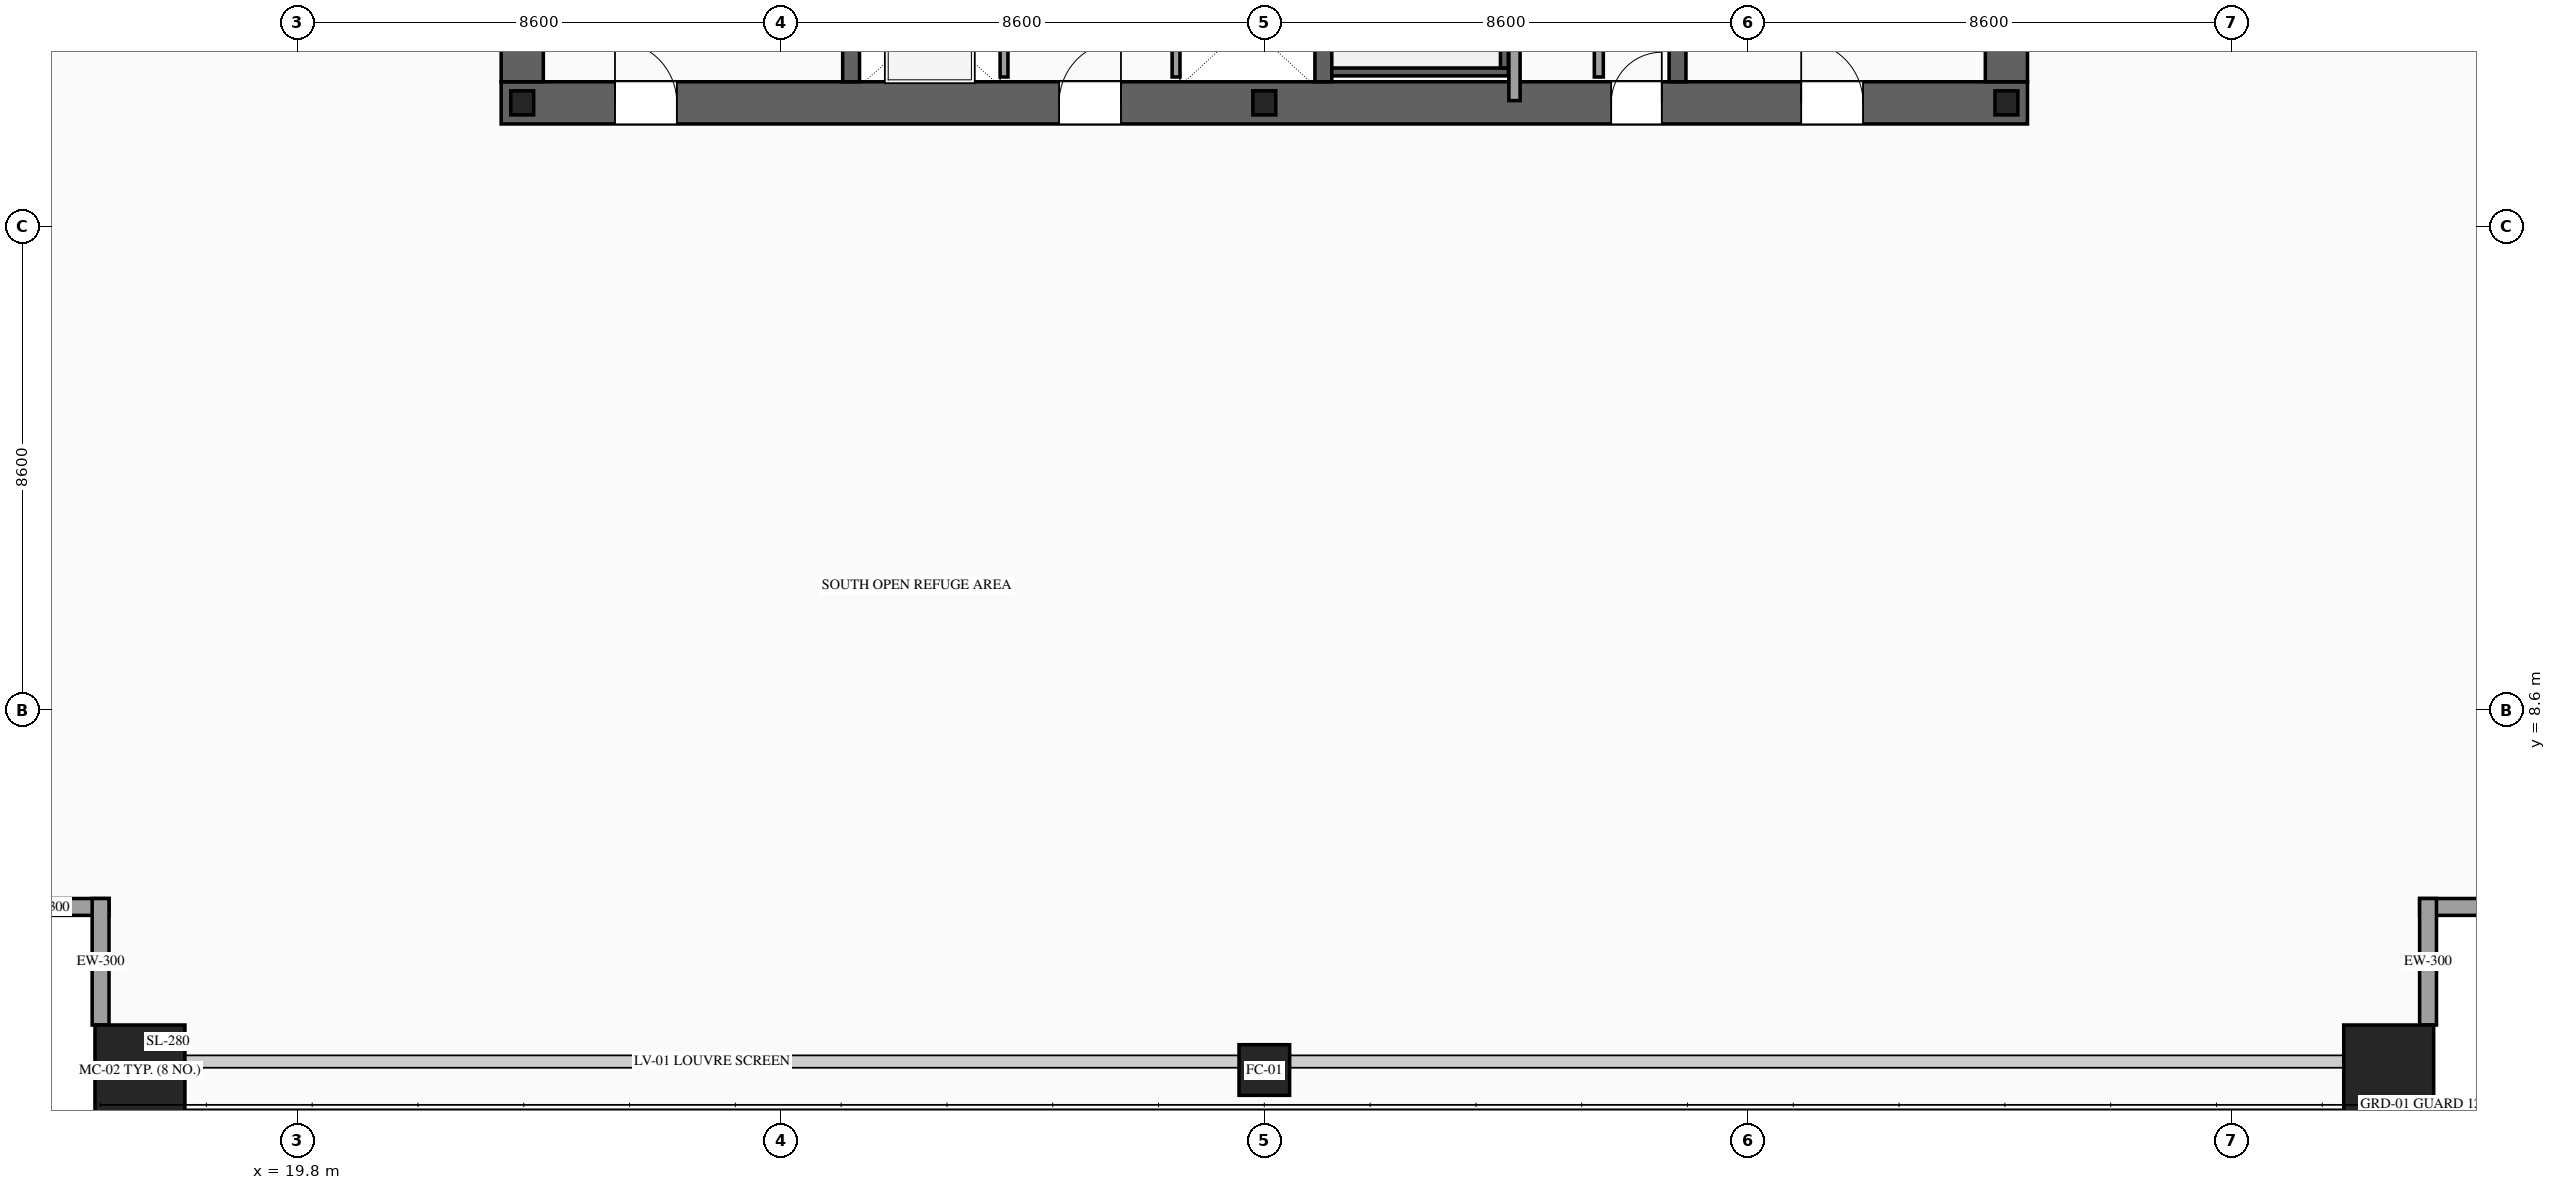
"""IFC4 building model, lengths in metres.
Left out: names, types, materials, properties, quantities, classifications, styles, units other than length and angle.
Written with IfcOpenShell. Run it as: python <this file> out.ifc"""

import sys

from ifc_helpers import new_model, si_unit, direction, frame, frame_2d, origin, origin_2d, place, context, subcontext, project, spatial, rectangle, hollow_rectangle, i_section, extrude, source, transform, mapped, element, fill, save


model = new_model("IFC4")
c1 = context("Model", 3, precision=1e-05, world=origin(), true_north=direction((0.0, 1.0)))
c2 = subcontext(c1, "Body", "Model", "MODEL_VIEW")
j1 = project(units=[si_unit("LENGTHUNIT", "METRE"), si_unit("PLANEANGLEUNIT", "RADIAN")], contexts=[c1])
p1 = place(None, origin())
s1 = spatial("IfcSite", under=j1, at=p1, CompositionType="ELEMENT")
p2 = place(p1, origin())
s2 = spatial("IfcBuilding", under=s1, at=p2, CompositionType="ELEMENT")
p3 = place(p2, frame((0.0, 0.0, 85.6)))
s3 = spatial("IfcBuildingStorey", under=s2, at=p3, CompositionType="ELEMENT", Elevation=85.6)
p4 = place(p3, frame((23.425, 19.4, 0.0), z_axis=(0.0, 0.0, 1.0), x_axis=(1.0, 0.0, 0.0)))
e1 = element("IfcWall", 1, at=p4, inside=s3, PredefinedType="SHEAR", context=c2, shape_type="SweptSolid", body=[
    extrude(rectangle(XDim=27.15, YDim=0.75, at=frame_2d((13.575, 0.0))), origin(), (0.0, 0.0, 1.0), 4.6),
])
p5 = place(p4, frame((2.025, 0.0, 0.0)))
e2 = element("IfcOpeningElement", 2, at=p5, cuts=e1, PredefinedType="OPENING", context=c2, shape_type="SweptSolid", body=[
    extrude(rectangle(XDim=1.1, YDim=2.2, at=frame_2d((0.55, 1.1))), frame((0.0, 0.39, 0.0), z_axis=(0.0, -1.0, 0.0), x_axis=(1.0, 0.0, 0.0)), (0.0, 0.0, 1.0), 0.78),
])
p6 = place(p4, frame((9.925, 0.0, 0.0)))
e3 = element("IfcOpeningElement", 3, at=p6, cuts=e1, PredefinedType="OPENING", context=c2, shape_type="SweptSolid", body=[
    extrude(rectangle(XDim=1.1, YDim=2.2, at=frame_2d((0.55, 1.1))), frame((0.0, 0.39, 0.0), z_axis=(0.0, -1.0, 0.0), x_axis=(1.0, 0.0, 0.0)), (0.0, 0.0, 1.0), 0.78),
])
p7 = place(p4, frame((23.125, 0.0, 0.0)))
e4 = element("IfcOpeningElement", 4, at=p7, cuts=e1, PredefinedType="OPENING", context=c2, shape_type="SweptSolid", body=[
    extrude(rectangle(XDim=1.1, YDim=2.2, at=frame_2d((0.55, 1.1))), frame((0.0, 0.39, 0.0), z_axis=(0.0, -1.0, 0.0), x_axis=(1.0, 0.0, 0.0)), (0.0, 0.0, 1.0), 0.78),
])
p8 = place(p4, frame((19.745, 0.0, 0.0)))
e5 = element("IfcOpeningElement", 5, at=p8, cuts=e1, PredefinedType="OPENING", context=c2, shape_type="SweptSolid", body=[
    extrude(rectangle(XDim=0.9, YDim=2.15, at=frame_2d((0.45, 1.075))), frame((0.0, 0.39, 0.0), z_axis=(0.0, -1.0, 0.0), x_axis=(1.0, 0.0, 0.0)), (0.0, 0.0, 1.0), 0.78),
])
m1 = source(origin(), c2, "Body", "SweptSolid", [
    extrude(rectangle(XDim=12.05, YDim=0.75, at=frame_2d((6.025, 0.0))), origin(), (0.0, 0.0, 1.0), 4.6),
])
for number, where, z_axis, x_axis in (
    (6, (23.8, 19.775, 0.0), (0.0, 0.0, 1.0), (0.0, 1.0, 0.0)),
    (7, (50.2, 19.775, 0.0), (0.0, 0.0, 1.0), (0.0, 1.0, 0.0)),
):
    element("IfcWall", number, at=place(p3, frame(where, z_axis=z_axis, x_axis=x_axis)), inside=s3, PredefinedType="SHEAR", context=c2, shape_type="MappedRepresentation", body=[
        mapped(m1, transform((0.0, 0.0, 0.0), scale=1.0)),
    ])
m2 = source(origin(), c2, "Body", "SweptSolid", [
    extrude(rectangle(XDim=12.05, YDim=0.3, at=frame_2d((6.025, 0.0))), origin(), (0.0, 0.0, 1.0), 4.6),
])
for number, where, z_axis, x_axis in (
    (8, (29.65, 19.775, 0.0), (0.0, 0.0, 1.0), (0.0, 1.0, 0.0)),
    (9, (38.05, 19.775, 0.0), (0.0, 0.0, 1.0), (0.0, 1.0, 0.0)),
    (10, (44.35, 19.775, 0.0), (0.0, 0.0, 1.0), (0.0, 1.0, 0.0)),
):
    element("IfcWall", number, at=place(p3, frame(where, z_axis=z_axis, x_axis=x_axis)), inside=s3, PredefinedType="SOLIDWALL", context=c2, shape_type="MappedRepresentation", body=[
        mapped(m2, transform((0.0, 0.0, 0.0), scale=1.0)),
    ])
m3 = source(origin(), c2, "Body", "SweptSolid", [
    extrude(i_section(OverallWidth=0.407, OverallDepth=0.428, WebThickness=0.02, FlangeThickness=0.035, at=origin_2d()), origin(), (0.0, 0.0, 1.0), 4.6),
])
for number, where, z_axis, x_axis in (
    (11, (23.8, 19.4, 0.0), (0.0, 0.0, 1.0), (1.0, 0.0, 0.0)),
    (12, (37.0, 19.4, 0.0), (0.0, 0.0, 1.0), (1.0, 0.0, 0.0)),
    (13, (50.2, 19.4, 0.0), (0.0, 0.0, 1.0), (1.0, 0.0, 0.0)),
):
    element("IfcColumn", number, at=place(p3, frame(where, z_axis=z_axis, x_axis=x_axis)), inside=s3, PredefinedType="COLUMN", context=c2, shape_type="MappedRepresentation", body=[
        mapped(m3, transform((0.0, 0.0, 0.0), scale=1.0)),
    ])
m4 = source(origin(), c2, "Body", "SweptSolid", [
    extrude(hollow_rectangle(XDim=1.6, YDim=1.6, WallThickness=0.07, at=origin_2d()), origin(), (0.0, 0.0, 1.0), 4.6),
])
p9 = place(p3, frame((17.0, 2.2, 0.0), z_axis=(0.0, 0.0, 1.0), x_axis=(1.0, 0.0, 0.0)))
e14 = element("IfcColumn", 14, at=p9, inside=s3, PredefinedType="COLUMN", context=c2, shape_type="MappedRepresentation", body=[
    mapped(m4, transform((0.0, 0.0, 0.0), scale=1.0)),
])
m5 = source(origin(), c2, "Body", "SweptSolid", [
    extrude(hollow_rectangle(XDim=0.9, YDim=0.9, WallThickness=0.042, at=origin_2d()), origin(), (0.0, 0.0, 1.0), 4.6),
])
p10 = place(p3, frame((37.0, 2.2, 0.0), z_axis=(0.0, 0.0, 1.0), x_axis=(1.0, 0.0, 0.0)))
e15 = element("IfcColumn", 15, at=p10, inside=s3, PredefinedType="COLUMN", context=c2, shape_type="MappedRepresentation", body=[
    mapped(m5, transform((0.0, 0.0, 0.0), scale=1.0)),
])
p11 = place(p3, frame((57.0, 2.2, 0.0), z_axis=(0.0, 0.0, 1.0), x_axis=(1.0, 0.0, 0.0)))
e16 = element("IfcColumn", 16, at=p11, inside=s3, PredefinedType="COLUMN", context=c2, shape_type="MappedRepresentation", body=[
    mapped(m4, transform((0.0, 0.0, 0.0), scale=1.0)),
])
m6 = source(origin(), c2, "Body", "SweptSolid", [
    extrude(rectangle(XDim=2.25, YDim=0.3, at=frame_2d((1.125, 0.0))), origin(), (0.0, 0.0, 1.0), 4.38),
])
for number, where, z_axis, x_axis in (
    (17, (14.2, 5.1, 0.0), (0.0, 0.0, 1.0), (1.0, 0.0, 0.0)),
    (18, (16.3, 5.25, 0.0), (0.0, 0.0, 1.0), (0.0, -1.0, 0.0)),
    (19, (57.55, 5.1, 0.0), (0.0, 0.0, 1.0), (1.0, 0.0, 0.0)),
    (20, (57.7, 3.0, 0.0), (0.0, 0.0, 1.0), (0.0, 1.0, 0.0)),
):
    element("IfcWall", number, at=place(p3, frame(where, z_axis=z_axis, x_axis=x_axis)), inside=s3, PredefinedType="SOLIDWALL", context=c2, shape_type="MappedRepresentation", body=[
        mapped(m6, transform((0.0, 0.0, 0.0), scale=1.0)),
    ])
p12 = place(p3, frame((32.37, 19.86, 0.0), z_axis=(0.0, 0.0, 1.0), x_axis=(0.0, 1.0, 0.0)))
e21 = element("IfcWall", 21, at=p12, inside=s3, PredefinedType="SOLIDWALL", context=c2, shape_type="SweptSolid", body=[
    extrude(rectangle(XDim=2.04, YDim=0.14, at=frame_2d((1.02, 0.0))), origin(), (0.0, 0.0, 1.0), 4.38),
])
p13 = place(p12, frame((0.47, 0.0, 0.0)))
e22 = element("IfcOpeningElement", 22, at=p13, cuts=e21, PredefinedType="OPENING", context=c2, shape_type="SweptSolid", body=[
    extrude(rectangle(XDim=1.1, YDim=2.2, at=frame_2d((0.55, 1.1))), frame((0.0, 0.085, 0.0), z_axis=(0.0, -1.0, 0.0), x_axis=(1.0, 0.0, 0.0)), (0.0, 0.0, 1.0), 0.17),
])
m7 = source(origin(), c2, "Body", "SweptSolid", [
    extrude(rectangle(XDim=2.04, YDim=0.14, at=frame_2d((1.02, 0.0))), origin(), (0.0, 0.0, 1.0), 4.38),
])
p14 = place(p3, frame((35.43, 19.86, 0.0), z_axis=(0.0, 0.0, 1.0), x_axis=(0.0, 1.0, 0.0)))
e23 = element("IfcWall", 23, at=p14, inside=s3, PredefinedType="SOLIDWALL", context=c2, shape_type="MappedRepresentation", body=[
    mapped(m7, transform((0.0, 0.0, 0.0), scale=1.0)),
])
m8 = source(origin(), c2, "Body", "SweptSolid", [
    extrude(rectangle(XDim=3.14, YDim=0.14, at=frame_2d((1.57, 0.0))), origin(), (0.0, 0.0, 1.0), 4.38),
])
p15 = place(p3, frame((38.2, 19.95, 0.0), z_axis=(0.0, 0.0, 1.0), x_axis=(1.0, 0.0, 0.0)))
e24 = element("IfcWall", 24, at=p15, inside=s3, PredefinedType="SOLIDWALL", context=c2, shape_type="MappedRepresentation", body=[
    mapped(m8, transform((0.0, 0.0, 0.0), scale=1.0)),
])
m9 = source(origin(), c2, "Body", "SweptSolid", [
    extrude(rectangle(XDim=8.94, YDim=0.14, at=frame_2d((4.47, 0.0))), origin(), (0.0, 0.0, 1.0), 4.38),
])
p16 = place(p3, frame((41.27, 20.02, 0.0), z_axis=(0.0, 0.0, 1.0), x_axis=(0.0, 1.0, 0.0)))
e25 = element("IfcWall", 25, at=p16, inside=s3, PredefinedType="SOLIDWALL", context=c2, shape_type="MappedRepresentation", body=[
    mapped(m9, transform((0.0, 0.0, 0.0), scale=1.0)),
])
m10 = source(origin(), c2, "Body", "SweptSolid", [
    extrude(rectangle(XDim=1.34, YDim=0.16, at=frame_2d((0.67, 0.0))), origin(), (0.0, 0.0, 1.0), 4.38),
])
p17 = place(p3, frame((42.95, 19.86, 0.0), z_axis=(0.0, 0.0, 1.0), x_axis=(0.0, 1.0, 0.0)))
e26 = element("IfcWall", 26, at=p17, inside=s3, PredefinedType="PARTITIONING", context=c2, shape_type="MappedRepresentation", body=[
    mapped(m10, transform((0.0, 0.0, 0.0), scale=1.0)),
])
m11 = source(origin(), c2, "Body", "SweptSolid", [
    extrude(rectangle(XDim=12.72, YDim=0.2, at=frame_2d((6.36, 0.0))), origin(), (0.0, 0.0, 1.0), 4.38),
])
p18 = place(p3, frame((41.45, 19.44, 0.0), z_axis=(0.0, 0.0, 1.0), x_axis=(0.0, 1.0, 0.0)))
e27 = element("IfcWall", 27, at=p18, inside=s3, PredefinedType="PARTITIONING", context=c2, shape_type="MappedRepresentation", body=[
    mapped(m11, transform((0.0, 0.0, 0.0), scale=1.0)),
])
m12 = source(origin(), c2, "Body", "SweptSolid", [
    extrude(rectangle(XDim=1.1, YDim=2.2, at=frame_2d((0.55, 1.1))), frame((0.0, 0.025, 0.0), z_axis=(0.0, -1.0, 0.0), x_axis=(1.0, 0.0, 0.0)), (0.0, 0.0, 1.0), 0.05),
])
p19 = place(p5, origin())
e28 = element("IfcDoor", 28, at=p19, inside=s3, OperationType="SINGLE_SWING_LEFT", PredefinedType="DOOR", context=c2, shape_type="MappedRepresentation", body=[
    mapped(m12, transform((0.0, 0.0, 0.0), scale=1.0)),
])
fill(e2, e28)
p20 = place(p6, origin())
e29 = element("IfcDoor", 29, at=p20, inside=s3, OperationType="SINGLE_SWING_RIGHT", PredefinedType="DOOR", context=c2, shape_type="MappedRepresentation", body=[
    mapped(m12, transform((0.0, 0.0, 0.0), scale=1.0)),
])
fill(e3, e29)
p21 = place(p7, origin())
e30 = element("IfcDoor", 30, at=p21, inside=s3, OperationType="SINGLE_SWING_LEFT", PredefinedType="DOOR", context=c2, shape_type="MappedRepresentation", body=[
    mapped(m12, transform((0.0, 0.0, 0.0), scale=1.0)),
])
fill(e4, e30)
m13 = source(origin(), c2, "Body", "SweptSolid", [
    extrude(rectangle(XDim=0.9, YDim=2.15, at=frame_2d((0.45, 1.075))), frame((0.0, 0.025, 0.0), z_axis=(0.0, -1.0, 0.0), x_axis=(1.0, 0.0, 0.0)), (0.0, 0.0, 1.0), 0.05),
])
p22 = place(p8, origin())
e31 = element("IfcDoor", 31, at=p22, inside=s3, OperationType="SINGLE_SWING_RIGHT", PredefinedType="DOOR", context=c2, shape_type="MappedRepresentation", body=[
    mapped(m13, transform((0.0, 0.0, 0.0), scale=1.0)),
])
fill(e5, e31)
save(model, sys.argv[1])
